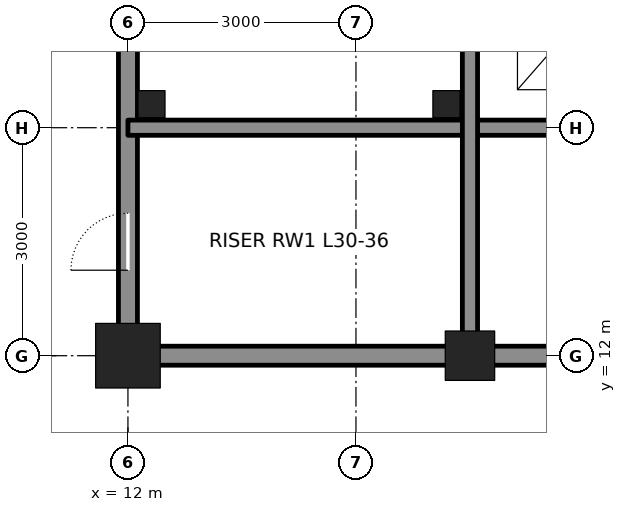
"""IFC4 building model, lengths in metres.
Left out: names, types, materials, properties, quantities, classifications, styles, units other than length and angle.
Written with IfcOpenShell. Run it as: python <this file> out.ifc"""

import sys

from ifc_helpers import new_model, si_unit, direction, frame, frame_2d, origin, origin_2d, place, context, subcontext, project, spatial, rectangle, hollow_rectangle, extrude, element, fill, save


model = new_model("IFC4")
c1 = context("Model", 3, precision=1e-05, world=origin(), true_north=direction((0.0, 1.0)))
c2 = subcontext(c1, "Body", "Model", "MODEL_VIEW")
j1 = project(units=[si_unit("LENGTHUNIT", "METRE"), si_unit("PLANEANGLEUNIT", "RADIAN")], contexts=[c1])
p1 = place(None, origin())
s1 = spatial("IfcSite", under=j1, at=p1, CompositionType="ELEMENT")
p2 = place(p1, origin())
s2 = spatial("IfcBuilding", under=s1, at=p2, CompositionType="ELEMENT")
p3 = place(p2, frame((0.0, 0.0, 140.4)))
s3 = spatial("IfcBuildingStorey", under=s2, at=p3, CompositionType="ELEMENT", Elevation=140.4)
p4 = place(p3, frame((12.0, 12.0, 0.0), z_axis=(0.0, 0.0, 1.0), x_axis=(1.0, 0.0, 0.0)))
e1 = element("IfcColumn", 1, at=p4, inside=s3, PredefinedType="COLUMN", context=c2, shape_type="SweptSolid", body=[
    extrude(hollow_rectangle(XDim=0.85, YDim=0.85, WallThickness=0.085, at=origin_2d()), origin(), (0.0, 0.0, 1.0), 4.2),
])
p5 = place(p3, frame((16.5, 12.0, 0.0), z_axis=(0.0, 0.0, 1.0), x_axis=(1.0, 0.0, 0.0)))
e2 = element("IfcColumn", 2, at=p5, inside=s3, PredefinedType="COLUMN", context=c2, shape_type="SweptSolid", body=[
    extrude(hollow_rectangle(XDim=0.65, YDim=0.65, WallThickness=0.065, at=origin_2d()), origin(), (0.0, 0.0, 1.0), 4.2),
])
p6 = place(p3, frame((12.0, 12.25, 0.0), z_axis=(0.0, 0.0, 1.0), x_axis=(0.0, 1.0, 0.0)))
e3 = element("IfcWall", 3, at=p6, inside=s3, PredefinedType="SOLIDWALL", context=c2, shape_type="SweptSolid", body=[
    extrude(rectangle(XDim=8.5, YDim=0.25, at=frame_2d((4.25, 0.0))), origin(), (0.0, 0.0, 1.0), 3.113),
])
p7 = place(p6, frame((0.875, 0.0, 0.0)))
e4 = element("IfcOpeningElement", 4, at=p7, cuts=e3, PredefinedType="OPENING", context=c2, shape_type="SweptSolid", body=[
    extrude(rectangle(XDim=0.75, YDim=2.1, at=frame_2d((0.375, 1.05))), frame((0.0, 0.135, 0.0), z_axis=(0.0, -1.0, 0.0), x_axis=(1.0, 0.0, 0.0)), (0.0, 0.0, 1.0), 0.27),
])
p8 = place(p3, frame((12.25, 12.0, 0.0), z_axis=(0.0, 0.0, 1.0), x_axis=(1.0, 0.0, 0.0)))
e5 = element("IfcWall", 5, at=p8, inside=s3, PredefinedType="SOLIDWALL", context=c2, shape_type="SweptSolid", body=[
    extrude(rectangle(XDim=4.0, YDim=0.25, at=frame_2d((2.0, 0.0))), origin(), (0.0, 0.0, 1.0), 3.182),
])
p9 = place(p3, frame((16.75, 12.0, 0.0), z_axis=(0.0, 0.0, 1.0), x_axis=(1.0, 0.0, 0.0)))
e6 = element("IfcWall", 6, at=p9, inside=s3, PredefinedType="SOLIDWALL", context=c2, shape_type="SweptSolid", body=[
    extrude(rectangle(XDim=2.5, YDim=0.25, at=frame_2d((1.25, 0.0))), origin(), (0.0, 0.0, 1.0), 3.182),
])
p10 = place(p3, frame((12.0, 15.0, 0.0), z_axis=(0.0, 0.0, 1.0), x_axis=(1.0, 0.0, 0.0)))
e7 = element("IfcWall", 7, at=p10, inside=s3, PredefinedType="SOLIDWALL", context=c2, shape_type="SweptSolid", body=[
    extrude(rectangle(XDim=7.5, YDim=0.2, at=frame_2d((3.75, 0.0))), origin(), (0.0, 0.0, 1.0), 4.04),
])
p11 = place(p3, frame((16.5, 12.25, 0.0), z_axis=(0.0, 0.0, 1.0), x_axis=(0.0, 1.0, 0.0)))
e8 = element("IfcWall", 8, at=p11, inside=s3, PredefinedType="SOLIDWALL", context=c2, shape_type="SweptSolid", body=[
    extrude(rectangle(XDim=8.5, YDim=0.2, at=frame_2d((4.25, 0.0))), origin(), (0.0, 0.0, 1.0), 3.113),
])
for number, where, z_axis, x_axis in (
    (9, (12.31, 15.31, 0.0), (0.0, 0.0, 1.0), (1.0, 0.0, 0.0)),
    (10, (16.19, 15.31, 0.0), (0.0, 0.0, 1.0), (1.0, 0.0, 0.0)),
):
    element("IfcColumn", number, at=place(p3, frame(where, z_axis=z_axis, x_axis=x_axis)), inside=s3, PredefinedType="COLUMN", context=c2, shape_type="SweptSolid", body=[
        extrude(hollow_rectangle(XDim=0.356, YDim=0.356, WallThickness=0.015, at=origin_2d()), origin(), (0.0, 0.0, 1.0), 4.2),
    ])
p12 = place(p7, origin())
e11 = element("IfcDoor", 11, at=p12, inside=s3, OperationType="SINGLE_SWING_LEFT", PredefinedType="DOOR", context=c2, shape_type="SweptSolid", body=[
    extrude(rectangle(XDim=0.75, YDim=2.1, at=frame_2d((0.375, 1.05))), frame((0.0, 0.025, 0.0), z_axis=(0.0, -1.0, 0.0), x_axis=(1.0, 0.0, 0.0)), (0.0, 0.0, 1.0), 0.05),
])
fill(e4, e11)
save(model, sys.argv[1])
